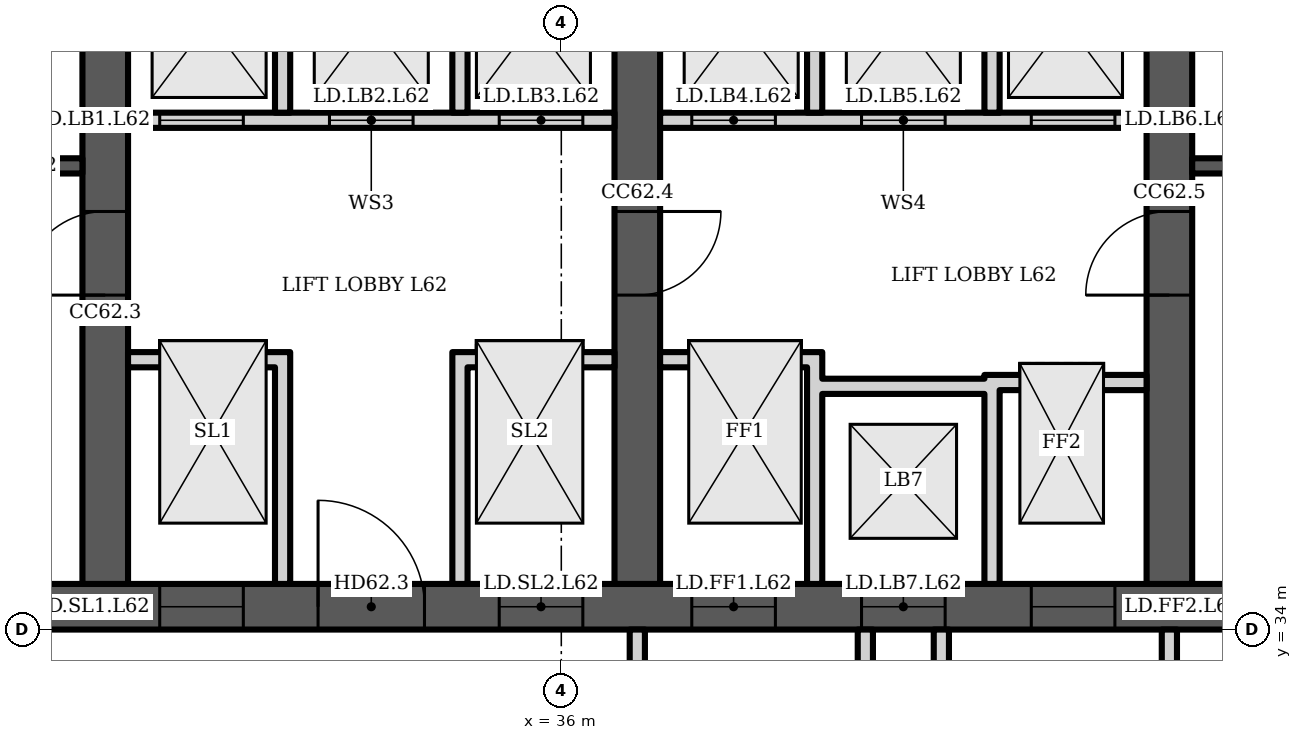
"""IFC4 building model, lengths in metres.
Left out: names, types, materials, properties, quantities, classifications, styles, units other than length and angle.
Written with IfcOpenShell. Run it as: python <this file> out.ifc"""

import sys

from ifc_helpers import new_model, si_unit, direction, frame, frame_2d, origin, place, context, subcontext, project, spatial, polyline, rectangle, outline, extrude, element, fill, save


model = new_model("IFC4")
c1 = context("Model", 3, precision=1e-05, world=origin(), true_north=direction((0.0, 1.0)))
c2 = subcontext(c1, "Body", "Model", "MODEL_VIEW")
j1 = project(units=[si_unit("LENGTHUNIT", "METRE"), si_unit("PLANEANGLEUNIT", "RADIAN")], contexts=[c1])
p1 = place(None, origin())
s1 = spatial("IfcSite", under=j1, at=p1, CompositionType="ELEMENT")
p2 = place(p1, origin())
s2 = spatial("IfcBuilding", under=s1, at=p2, CompositionType="ELEMENT")
p3 = place(p2, frame((0.0, 0.0, 246.7)))
s3 = spatial("IfcBuildingStorey", under=s2, at=p3, CompositionType="ELEMENT", Elevation=246.7)
p4 = place(p3, frame((23.0, 34.3, 0.0), z_axis=(0.0, 0.0, 1.0), x_axis=(1.0, 0.0, 0.0)))
e1 = element("IfcWall", 1, at=p4, inside=s3, PredefinedType="SHEAR", context=c2, shape_type="SweptSolid", body=[
    extrude(rectangle(XDim=35.0, YDim=0.6, at=frame_2d((17.5, 0.0))), origin(), (0.0, 0.0, 1.0), 3.6),
])
p5 = place(p4, frame((0.65, 0.0, 0.0)))
e2 = element("IfcOpeningElement", 2, at=p5, cuts=e1, PredefinedType="OPENING", context=c2, shape_type="SweptSolid", body=[
    extrude(rectangle(XDim=1.2, YDim=2.1, at=frame_2d((0.6, 1.05))), frame((0.0, 0.31, 0.0), z_axis=(0.0, -1.0, 0.0), x_axis=(1.0, 0.0, 0.0)), (0.0, 0.0, 1.0), 0.62),
])
p6 = place(p4, frame((7.717, 0.0, 0.0)))
e3 = element("IfcOpeningElement", 3, at=p6, cuts=e1, PredefinedType="OPENING", context=c2, shape_type="SweptSolid", body=[
    extrude(rectangle(XDim=1.1, YDim=2.1, at=frame_2d((0.55, 1.05))), frame((0.0, 0.31, 0.0), z_axis=(0.0, -1.0, 0.0), x_axis=(1.0, 0.0, 0.0)), (0.0, 0.0, 1.0), 0.62),
])
p7 = place(p4, frame((12.183, 0.0, 0.0)))
e4 = element("IfcOpeningElement", 4, at=p7, cuts=e1, PredefinedType="OPENING", context=c2, shape_type="SweptSolid", body=[
    extrude(rectangle(XDim=1.1, YDim=2.1, at=frame_2d((0.55, 1.05))), frame((0.0, 0.31, 0.0), z_axis=(0.0, -1.0, 0.0), x_axis=(1.0, 0.0, 0.0)), (0.0, 0.0, 1.0), 0.62),
])
p8 = place(p4, frame((9.8, 0.0, 0.0)))
e5 = element("IfcOpeningElement", 5, at=p8, cuts=e1, PredefinedType="OPENING", context=c2, shape_type="SweptSolid", body=[
    extrude(rectangle(XDim=1.4, YDim=2.1, at=frame_2d((0.7, 1.05))), frame((0.0, 0.31, 0.0), z_axis=(0.0, -1.0, 0.0), x_axis=(1.0, 0.0, 0.0)), (0.0, 0.0, 1.0), 0.62),
])
p9 = place(p4, frame((14.717, 0.0, 0.0)))
e6 = element("IfcOpeningElement", 6, at=p9, cuts=e1, PredefinedType="OPENING", context=c2, shape_type="SweptSolid", body=[
    extrude(rectangle(XDim=1.1, YDim=2.1, at=frame_2d((0.55, 1.05))), frame((0.0, 0.31, 0.0), z_axis=(0.0, -1.0, 0.0), x_axis=(1.0, 0.0, 0.0)), (0.0, 0.0, 1.0), 0.62),
])
p10 = place(p4, frame((16.95, 0.0, 0.0)))
e7 = element("IfcOpeningElement", 7, at=p10, cuts=e1, PredefinedType="OPENING", context=c2, shape_type="SweptSolid", body=[
    extrude(rectangle(XDim=1.1, YDim=2.1, at=frame_2d((0.55, 1.05))), frame((0.0, 0.31, 0.0), z_axis=(0.0, -1.0, 0.0), x_axis=(1.0, 0.0, 0.0)), (0.0, 0.0, 1.0), 0.62),
])
p11 = place(p4, frame((19.183, 0.0, 0.0)))
e8 = element("IfcOpeningElement", 8, at=p11, cuts=e1, PredefinedType="OPENING", context=c2, shape_type="SweptSolid", body=[
    extrude(rectangle(XDim=1.1, YDim=2.1, at=frame_2d((0.55, 1.05))), frame((0.0, 0.31, 0.0), z_axis=(0.0, -1.0, 0.0), x_axis=(1.0, 0.0, 0.0)), (0.0, 0.0, 1.0), 0.62),
])
p12 = place(p4, frame((26.15, 0.0, 0.0)))
e9 = element("IfcOpeningElement", 9, at=p12, cuts=e1, PredefinedType="OPENING", context=c2, shape_type="SweptSolid", body=[
    extrude(rectangle(XDim=1.2, YDim=2.1, at=frame_2d((0.6, 1.05))), frame((0.0, 0.31, 0.0), z_axis=(0.0, -1.0, 0.0), x_axis=(1.0, 0.0, 0.0)), (0.0, 0.0, 1.0), 0.62),
])
p13 = place(p4, frame((30.8, 0.0, 0.0)))
e10 = element("IfcOpeningElement", 10, at=p13, cuts=e1, PredefinedType="OPENING", context=c2, shape_type="SweptSolid", body=[
    extrude(rectangle(XDim=1.4, YDim=2.1, at=frame_2d((0.7, 1.05))), frame((0.0, 0.31, 0.0), z_axis=(0.0, -1.0, 0.0), x_axis=(1.0, 0.0, 0.0)), (0.0, 0.0, 1.0), 0.62),
])
p14 = place(p3, frame((30.0, 34.6, 0.0), z_axis=(0.0, 0.0, 1.0), x_axis=(0.0, 1.0, 0.0)))
e11 = element("IfcWall", 11, at=p14, inside=s3, PredefinedType="SHEAR", context=c2, shape_type="SweptSolid", body=[
    extrude(rectangle(XDim=14.171, YDim=0.6, at=frame_2d((7.085, 0.0))), origin(), (0.0, 0.0, 1.0), 3.6),
])
p15 = place(p14, frame((3.8, 0.0, 0.0)))
e12 = element("IfcOpeningElement", 12, at=p15, cuts=e11, PredefinedType="OPENING", context=c2, shape_type="SweptSolid", body=[
    extrude(rectangle(XDim=1.1, YDim=2.1, at=frame_2d((0.55, 1.05))), frame((0.0, 0.31, 0.0), z_axis=(0.0, -1.0, 0.0), x_axis=(1.0, 0.0, 0.0)), (0.0, 0.0, 1.0), 0.62),
])
p16 = place(p3, frame((37.0, 34.6, 0.0), z_axis=(0.0, 0.0, 1.0), x_axis=(0.0, 1.0, 0.0)))
e13 = element("IfcWall", 13, at=p16, inside=s3, PredefinedType="SHEAR", context=c2, shape_type="SweptSolid", body=[
    extrude(rectangle(XDim=14.784, YDim=0.6, at=frame_2d((7.392, 0.0))), origin(), (0.0, 0.0, 1.0), 3.6),
])
p17 = place(p16, frame((11.302, 0.0, 0.0)))
e14 = element("IfcOpeningElement", 14, at=p17, cuts=e13, PredefinedType="OPENING", context=c2, shape_type="SweptSolid", body=[
    extrude(rectangle(XDim=1.0, YDim=2.1, at=frame_2d((0.5, 1.05))), frame((0.0, 0.31, 0.0), z_axis=(0.0, -1.0, 0.0), x_axis=(1.0, 0.0, 0.0)), (0.0, 0.0, 1.0), 0.62),
])
p18 = place(p16, frame((3.8, 0.0, 0.0)))
e15 = element("IfcOpeningElement", 15, at=p18, cuts=e13, PredefinedType="OPENING", context=c2, shape_type="SweptSolid", body=[
    extrude(rectangle(XDim=1.1, YDim=2.1, at=frame_2d((0.55, 1.05))), frame((0.0, 0.31, 0.0), z_axis=(0.0, -1.0, 0.0), x_axis=(1.0, 0.0, 0.0)), (0.0, 0.0, 1.0), 0.62),
])
p19 = place(p3, frame((44.0, 34.6, 0.0), z_axis=(0.0, 0.0, 1.0), x_axis=(0.0, 1.0, 0.0)))
e16 = element("IfcWall", 16, at=p19, inside=s3, PredefinedType="SHEAR", context=c2, shape_type="SweptSolid", body=[
    extrude(rectangle(XDim=14.784, YDim=0.6, at=frame_2d((7.392, 0.0))), origin(), (0.0, 0.0, 1.0), 3.6),
])
p20 = place(p19, frame((11.608, 0.0, 0.0)))
e17 = element("IfcOpeningElement", 17, at=p20, cuts=e16, PredefinedType="OPENING", context=c2, shape_type="SweptSolid", body=[
    extrude(rectangle(XDim=1.0, YDim=2.1, at=frame_2d((0.5, 1.05))), frame((0.0, 0.31, 0.0), z_axis=(0.0, -1.0, 0.0), x_axis=(1.0, 0.0, 0.0)), (0.0, 0.0, 1.0), 0.62),
])
p21 = place(p19, frame((3.8, 0.0, 0.0)))
e18 = element("IfcOpeningElement", 18, at=p21, cuts=e16, PredefinedType="OPENING", context=c2, shape_type="SweptSolid", body=[
    extrude(rectangle(XDim=1.1, YDim=2.1, at=frame_2d((0.55, 1.05))), frame((0.0, 0.31, 0.0), z_axis=(0.0, -1.0, 0.0), x_axis=(1.0, 0.0, 0.0)), (0.0, 0.0, 1.0), 0.62),
])
p22 = place(p3, frame((23.6, 40.1, 0.0), z_axis=(0.0, 0.0, 1.0), x_axis=(1.0, 0.0, 0.0)))
e19 = element("IfcWall", 19, at=p22, inside=s3, PredefinedType="SHEAR", context=c2, shape_type="SweptSolid", body=[
    extrude(rectangle(XDim=6.1, YDim=0.2, at=frame_2d((3.05, 0.0))), origin(), (0.0, 0.0, 1.0), 3.2),
])
p23 = place(p22, frame((3.325, 0.0, 0.0)))
e20 = element("IfcOpeningElement", 20, at=p23, cuts=e19, PredefinedType="OPENING", context=c2, shape_type="SweptSolid", body=[
    extrude(rectangle(XDim=1.2, YDim=2.1, at=frame_2d((0.6, 1.05))), frame((0.0, 0.11, 0.0), z_axis=(0.0, -1.0, 0.0), x_axis=(1.0, 0.0, 0.0)), (0.0, 0.0, 1.0), 0.22),
])
p24 = place(p22, frame((0.475, 0.0, 0.0)))
e21 = element("IfcOpeningElement", 21, at=p24, cuts=e19, PredefinedType="OPENING", context=c2, shape_type="SweptSolid", body=[
    extrude(rectangle(XDim=0.9, YDim=2.1, at=frame_2d((0.45, 1.05))), frame((0.0, 0.11, 0.0), z_axis=(0.0, -1.0, 0.0), x_axis=(1.0, 0.0, 0.0)), (0.0, 0.0, 1.0), 0.22),
])
p25 = place(p3, frame((30.3, 40.7, 0.0), z_axis=(0.0, 0.0, 1.0), x_axis=(1.0, 0.0, 0.0)))
e22 = element("IfcWall", 22, at=p25, inside=s3, PredefinedType="PARTITIONING", context=c2, shape_type="SweptSolid", body=[
    extrude(rectangle(XDim=6.4, YDim=0.2, at=frame_2d((3.2, 0.0))), origin(), (0.0, 0.0, 1.0), 3.2),
])
p26 = place(p25, frame((0.417, 0.0, 0.0)))
e23 = element("IfcOpeningElement", 23, at=p26, cuts=e22, PredefinedType="OPENING", context=c2, shape_type="SweptSolid", body=[
    extrude(rectangle(XDim=1.1, YDim=2.1, at=frame_2d((0.55, 1.05))), frame((0.0, 0.11, 0.0), z_axis=(0.0, -1.0, 0.0), x_axis=(1.0, 0.0, 0.0)), (0.0, 0.0, 1.0), 0.22),
])
p27 = place(p25, frame((2.65, 0.0, 0.0)))
e24 = element("IfcOpeningElement", 24, at=p27, cuts=e22, PredefinedType="OPENING", context=c2, shape_type="SweptSolid", body=[
    extrude(rectangle(XDim=1.1, YDim=2.1, at=frame_2d((0.55, 1.05))), frame((0.0, 0.11, 0.0), z_axis=(0.0, -1.0, 0.0), x_axis=(1.0, 0.0, 0.0)), (0.0, 0.0, 1.0), 0.22),
])
p28 = place(p25, frame((4.883, 0.0, 0.0)))
e25 = element("IfcOpeningElement", 25, at=p28, cuts=e22, PredefinedType="OPENING", context=c2, shape_type="SweptSolid", body=[
    extrude(rectangle(XDim=1.1, YDim=2.1, at=frame_2d((0.55, 1.05))), frame((0.0, 0.11, 0.0), z_axis=(0.0, -1.0, 0.0), x_axis=(1.0, 0.0, 0.0)), (0.0, 0.0, 1.0), 0.22),
])
p29 = place(p3, frame((0.0, 0.0, -0.0)))
e26 = element("IfcWall", 26, at=p29, inside=s3, PredefinedType="PARTITIONING", context=c2, shape_type="SweptSolid", body=[
    extrude(outline(polyline([(32.233, 37.45), (30.3, 37.45), (30.3, 37.65), (32.233, 37.65), (32.433, 37.65), (32.433, 34.6), (32.233, 34.6), (32.233, 37.45)])), origin(), (0.0, 0.0, 1.0), 3.2),
])
p30 = place(p3, frame((0.0, 0.0, -0.0)))
e27 = element("IfcWall", 27, at=p30, inside=s3, PredefinedType="PARTITIONING", context=c2, shape_type="SweptSolid", body=[
    extrude(outline(polyline([(34.567, 37.65), (34.767, 37.65), (36.7, 37.65), (36.7, 37.45), (34.767, 37.45), (34.767, 34.6), (34.567, 34.6), (34.567, 37.65)])), origin(), (0.0, 0.0, 1.0), 3.2),
])
p31 = place(p3, frame((0.0, 0.0, -0.0)))
e28 = element("IfcWall", 28, at=p31, inside=s3, PredefinedType="PARTITIONING", context=c2, shape_type="SweptSolid", body=[
    extrude(outline(polyline([(32.433, 40.8), (32.233, 40.8), (32.233, 43.8), (30.3, 43.8), (30.3, 44.0), (36.7, 44.0), (36.7, 43.8), (34.767, 43.8), (34.767, 40.8), (34.567, 40.8), (34.567, 43.8), (32.433, 43.8), (32.433, 40.8)])), origin(), (0.0, 0.0, 1.0), 3.2),
])
p32 = place(p3, frame((37.3, 40.7, 0.0), z_axis=(0.0, 0.0, 1.0), x_axis=(1.0, 0.0, 0.0)))
e29 = element("IfcWall", 29, at=p32, inside=s3, PredefinedType="PARTITIONING", context=c2, shape_type="SweptSolid", body=[
    extrude(rectangle(XDim=6.4, YDim=0.2, at=frame_2d((3.2, 0.0))), origin(), (0.0, 0.0, 1.0), 3.2),
])
p33 = place(p32, frame((0.417, 0.0, 0.0)))
e30 = element("IfcOpeningElement", 30, at=p33, cuts=e29, PredefinedType="OPENING", context=c2, shape_type="SweptSolid", body=[
    extrude(rectangle(XDim=1.1, YDim=2.1, at=frame_2d((0.55, 1.05))), frame((0.0, 0.11, 0.0), z_axis=(0.0, -1.0, 0.0), x_axis=(1.0, 0.0, 0.0)), (0.0, 0.0, 1.0), 0.22),
])
p34 = place(p32, frame((2.65, 0.0, 0.0)))
e31 = element("IfcOpeningElement", 31, at=p34, cuts=e29, PredefinedType="OPENING", context=c2, shape_type="SweptSolid", body=[
    extrude(rectangle(XDim=1.1, YDim=2.1, at=frame_2d((0.55, 1.05))), frame((0.0, 0.11, 0.0), z_axis=(0.0, -1.0, 0.0), x_axis=(1.0, 0.0, 0.0)), (0.0, 0.0, 1.0), 0.22),
])
p35 = place(p32, frame((4.883, 0.0, 0.0)))
e32 = element("IfcOpeningElement", 32, at=p35, cuts=e29, PredefinedType="OPENING", context=c2, shape_type="SweptSolid", body=[
    extrude(rectangle(XDim=1.1, YDim=2.1, at=frame_2d((0.55, 1.05))), frame((0.0, 0.11, 0.0), z_axis=(0.0, -1.0, 0.0), x_axis=(1.0, 0.0, 0.0)), (0.0, 0.0, 1.0), 0.22),
])
p36 = place(p3, frame((0.0, 0.0, -0.0)))
e33 = element("IfcWall", 33, at=p36, inside=s3, PredefinedType="PARTITIONING", context=c2, shape_type="SweptSolid", body=[
    extrude(outline(polyline([(41.567, 37.1), (39.433, 37.1), (39.433, 34.6), (39.233, 34.6), (39.233, 37.45), (37.3, 37.45), (37.3, 37.65), (39.233, 37.65), (39.433, 37.65), (39.433, 37.3), (41.567, 37.3), (41.567, 37.35), (41.767, 37.35), (43.7, 37.35), (43.7, 37.15), (41.767, 37.15), (41.767, 34.6), (41.567, 34.6), (41.567, 37.1)])), origin(), (0.0, 0.0, 1.0), 3.2),
])
p37 = place(p3, frame((0.0, 0.0, -0.0)))
e34 = element("IfcWall", 34, at=p37, inside=s3, PredefinedType="PARTITIONING", context=c2, shape_type="SweptSolid", body=[
    extrude(outline(polyline([(39.433, 40.8), (39.233, 40.8), (39.233, 43.8), (37.3, 43.8), (37.3, 44.0), (43.7, 44.0), (43.7, 43.8), (41.767, 43.8), (41.767, 40.8), (41.567, 40.8), (41.567, 43.8), (39.433, 43.8), (39.433, 40.8)])), origin(), (0.0, 0.0, 1.0), 3.2),
])
p38 = place(p3, frame((44.3, 40.1, 0.0), z_axis=(0.0, 0.0, 1.0), x_axis=(1.0, 0.0, 0.0)))
e35 = element("IfcWall", 35, at=p38, inside=s3, PredefinedType="SHEAR", context=c2, shape_type="SweptSolid", body=[
    extrude(rectangle(XDim=6.4, YDim=0.2, at=frame_2d((3.2, 0.0))), origin(), (0.0, 0.0, 1.0), 3.2),
])
p39 = place(p38, frame((3.625, 0.0, 0.0)))
e36 = element("IfcOpeningElement", 36, at=p39, cuts=e35, PredefinedType="OPENING", context=c2, shape_type="SweptSolid", body=[
    extrude(rectangle(XDim=1.2, YDim=2.1, at=frame_2d((0.6, 1.05))), frame((0.0, 0.11, 0.0), z_axis=(0.0, -1.0, 0.0), x_axis=(1.0, 0.0, 0.0)), (0.0, 0.0, 1.0), 0.22),
])
p40 = place(p38, frame((0.625, 0.0, 0.0)))
e37 = element("IfcOpeningElement", 37, at=p40, cuts=e35, PredefinedType="OPENING", context=c2, shape_type="SweptSolid", body=[
    extrude(rectangle(XDim=0.9, YDim=2.1, at=frame_2d((0.45, 1.05))), frame((0.0, 0.11, 0.0), z_axis=(0.0, -1.0, 0.0), x_axis=(1.0, 0.0, 0.0)), (0.0, 0.0, 1.0), 0.22),
])
p41 = place(p3, frame((37.0, 30.5, 0.0), z_axis=(0.0, 0.0, 1.0), x_axis=(0.0, 1.0, 0.0)))
e38 = element("IfcWall", 38, at=p41, inside=s3, PredefinedType="PARTITIONING", context=c2, shape_type="SweptSolid", body=[
    extrude(rectangle(XDim=3.5, YDim=0.2, at=frame_2d((1.75, 0.0))), origin(), (0.0, 0.0, 1.0), 3.2),
])
p42 = place(p41, frame((1.2, 0.0, 0.0)))
e39 = element("IfcOpeningElement", 39, at=p42, cuts=e38, PredefinedType="OPENING", context=c2, shape_type="SweptSolid", body=[
    extrude(rectangle(XDim=1.1, YDim=2.1, at=frame_2d((0.55, 1.05))), frame((0.0, 0.11, 0.0), z_axis=(0.0, -1.0, 0.0), x_axis=(1.0, 0.0, 0.0)), (0.0, 0.0, 1.0), 0.22),
])
for number, where, z_axis, x_axis in (
    (40, (40.0, 30.5, 0.0), (0.0, 0.0, 1.0), (0.0, 1.0, 0.0)),
    (41, (41.0, 30.5, 0.0), (0.0, 0.0, 1.0), (0.0, 1.0, 0.0)),
):
    element("IfcWall", number, at=place(p3, frame(where, z_axis=z_axis, x_axis=x_axis)), inside=s3, PredefinedType="PARTITIONING", context=c2, shape_type="SweptSolid", body=[
        extrude(rectangle(XDim=3.5, YDim=0.2, at=frame_2d((1.75, 0.0))), origin(), (0.0, 0.0, 1.0), 3.2),
    ])
p43 = place(p3, frame((44.0, 30.5, 0.0), z_axis=(0.0, 0.0, 1.0), x_axis=(0.0, 1.0, 0.0)))
e42 = element("IfcWall", 42, at=p43, inside=s3, PredefinedType="PARTITIONING", context=c2, shape_type="SweptSolid", body=[
    extrude(rectangle(XDim=3.5, YDim=0.2, at=frame_2d((1.75, 0.0))), origin(), (0.0, 0.0, 1.0), 3.2),
])
p44 = place(p43, frame((1.2, 0.0, 0.0)))
e43 = element("IfcOpeningElement", 43, at=p44, cuts=e42, PredefinedType="OPENING", context=c2, shape_type="SweptSolid", body=[
    extrude(rectangle(XDim=1.1, YDim=2.1, at=frame_2d((0.55, 1.05))), frame((0.0, 0.11, 0.0), z_axis=(0.0, -1.0, 0.0), x_axis=(1.0, 0.0, 0.0)), (0.0, 0.0, 1.0), 0.22),
])
p45 = place(p6, origin())
e44 = element("IfcDoor", 44, at=p45, inside=s3, OperationType="DOUBLE_DOOR_SLIDING", PredefinedType="DOOR", context=c2, shape_type="SweptSolid", body=[
    extrude(rectangle(XDim=1.1, YDim=2.1, at=frame_2d((0.55, 1.05))), frame((0.0, 0.025, 0.0), z_axis=(0.0, -1.0, 0.0), x_axis=(1.0, 0.0, 0.0)), (0.0, 0.0, 1.0), 0.05),
])
fill(e3, e44)
p46 = place(p7, origin())
e45 = element("IfcDoor", 45, at=p46, inside=s3, OperationType="DOUBLE_DOOR_SLIDING", PredefinedType="DOOR", context=c2, shape_type="SweptSolid", body=[
    extrude(rectangle(XDim=1.1, YDim=2.1, at=frame_2d((0.55, 1.05))), frame((0.0, 0.025, 0.0), z_axis=(0.0, -1.0, 0.0), x_axis=(1.0, 0.0, 0.0)), (0.0, 0.0, 1.0), 0.05),
])
fill(e4, e45)
p47 = place(p8, origin())
e46 = element("IfcDoor", 46, at=p47, inside=s3, OperationType="DOUBLE_DOOR_SINGLE_SWING", PredefinedType="DOOR", context=c2, shape_type="SweptSolid", body=[
    extrude(rectangle(XDim=1.4, YDim=2.1, at=frame_2d((0.7, 1.05))), frame((0.0, 0.025, 0.0), z_axis=(0.0, -1.0, 0.0), x_axis=(1.0, 0.0, 0.0)), (0.0, 0.0, 1.0), 0.05),
])
fill(e5, e46)
p48 = place(p26, origin())
e47 = element("IfcDoor", 47, at=p48, inside=s3, OperationType="DOUBLE_DOOR_SLIDING", PredefinedType="DOOR", context=c2, shape_type="SweptSolid", body=[
    extrude(rectangle(XDim=1.1, YDim=2.1, at=frame_2d((0.55, 1.05))), frame((0.0, 0.025, 0.0), z_axis=(0.0, -1.0, 0.0), x_axis=(1.0, 0.0, 0.0)), (0.0, 0.0, 1.0), 0.05),
])
fill(e23, e47)
p49 = place(p27, origin())
e48 = element("IfcDoor", 48, at=p49, inside=s3, OperationType="DOUBLE_DOOR_SLIDING", PredefinedType="DOOR", context=c2, shape_type="SweptSolid", body=[
    extrude(rectangle(XDim=1.1, YDim=2.1, at=frame_2d((0.55, 1.05))), frame((0.0, 0.025, 0.0), z_axis=(0.0, -1.0, 0.0), x_axis=(1.0, 0.0, 0.0)), (0.0, 0.0, 1.0), 0.05),
])
fill(e24, e48)
p50 = place(p28, origin())
e49 = element("IfcDoor", 49, at=p50, inside=s3, OperationType="DOUBLE_DOOR_SLIDING", PredefinedType="DOOR", context=c2, shape_type="SweptSolid", body=[
    extrude(rectangle(XDim=1.1, YDim=2.1, at=frame_2d((0.55, 1.05))), frame((0.0, 0.025, 0.0), z_axis=(0.0, -1.0, 0.0), x_axis=(1.0, 0.0, 0.0)), (0.0, 0.0, 1.0), 0.05),
])
fill(e25, e49)
p51 = place(p9, origin())
e50 = element("IfcDoor", 50, at=p51, inside=s3, OperationType="DOUBLE_DOOR_SLIDING", PredefinedType="DOOR", context=c2, shape_type="SweptSolid", body=[
    extrude(rectangle(XDim=1.1, YDim=2.1, at=frame_2d((0.55, 1.05))), frame((0.0, 0.025, 0.0), z_axis=(0.0, -1.0, 0.0), x_axis=(1.0, 0.0, 0.0)), (0.0, 0.0, 1.0), 0.05),
])
fill(e6, e50)
p52 = place(p10, origin())
e51 = element("IfcDoor", 51, at=p52, inside=s3, OperationType="DOUBLE_DOOR_SLIDING", PredefinedType="DOOR", context=c2, shape_type="SweptSolid", body=[
    extrude(rectangle(XDim=1.1, YDim=2.1, at=frame_2d((0.55, 1.05))), frame((0.0, 0.025, 0.0), z_axis=(0.0, -1.0, 0.0), x_axis=(1.0, 0.0, 0.0)), (0.0, 0.0, 1.0), 0.05),
])
fill(e7, e51)
p53 = place(p11, origin())
e52 = element("IfcDoor", 52, at=p53, inside=s3, OperationType="DOUBLE_DOOR_SLIDING", PredefinedType="DOOR", context=c2, shape_type="SweptSolid", body=[
    extrude(rectangle(XDim=1.1, YDim=2.1, at=frame_2d((0.55, 1.05))), frame((0.0, 0.025, 0.0), z_axis=(0.0, -1.0, 0.0), x_axis=(1.0, 0.0, 0.0)), (0.0, 0.0, 1.0), 0.05),
])
fill(e8, e52)
p54 = place(p33, origin())
e53 = element("IfcDoor", 53, at=p54, inside=s3, OperationType="DOUBLE_DOOR_SLIDING", PredefinedType="DOOR", context=c2, shape_type="SweptSolid", body=[
    extrude(rectangle(XDim=1.1, YDim=2.1, at=frame_2d((0.55, 1.05))), frame((0.0, 0.025, 0.0), z_axis=(0.0, -1.0, 0.0), x_axis=(1.0, 0.0, 0.0)), (0.0, 0.0, 1.0), 0.05),
])
fill(e30, e53)
p55 = place(p34, origin())
e54 = element("IfcDoor", 54, at=p55, inside=s3, OperationType="DOUBLE_DOOR_SLIDING", PredefinedType="DOOR", context=c2, shape_type="SweptSolid", body=[
    extrude(rectangle(XDim=1.1, YDim=2.1, at=frame_2d((0.55, 1.05))), frame((0.0, 0.025, 0.0), z_axis=(0.0, -1.0, 0.0), x_axis=(1.0, 0.0, 0.0)), (0.0, 0.0, 1.0), 0.05),
])
fill(e31, e54)
p56 = place(p35, origin())
e55 = element("IfcDoor", 55, at=p56, inside=s3, OperationType="DOUBLE_DOOR_SLIDING", PredefinedType="DOOR", context=c2, shape_type="SweptSolid", body=[
    extrude(rectangle(XDim=1.1, YDim=2.1, at=frame_2d((0.55, 1.05))), frame((0.0, 0.025, 0.0), z_axis=(0.0, -1.0, 0.0), x_axis=(1.0, 0.0, 0.0)), (0.0, 0.0, 1.0), 0.05),
])
fill(e32, e55)
p57 = place(p15, origin())
e56 = element("IfcDoor", 56, at=p57, inside=s3, OperationType="SINGLE_SWING_LEFT", PredefinedType="DOOR", context=c2, shape_type="SweptSolid", body=[
    extrude(rectangle(XDim=1.1, YDim=2.1, at=frame_2d((0.55, 1.05))), frame((0.0, 0.025, 0.0), z_axis=(0.0, -1.0, 0.0), x_axis=(1.0, 0.0, 0.0)), (0.0, 0.0, 1.0), 0.05),
])
fill(e12, e56)
p58 = place(p18, origin())
e57 = element("IfcDoor", 57, at=p58, inside=s3, OperationType="SINGLE_SWING_RIGHT", PredefinedType="DOOR", context=c2, shape_type="SweptSolid", body=[
    extrude(rectangle(XDim=1.1, YDim=2.1, at=frame_2d((0.55, 1.05))), frame((0.0, 0.025, 0.0), z_axis=(0.0, -1.0, 0.0), x_axis=(1.0, 0.0, 0.0)), (0.0, 0.0, 1.0), 0.05),
])
fill(e15, e57)
p59 = place(p21, origin())
e58 = element("IfcDoor", 58, at=p59, inside=s3, OperationType="SINGLE_SWING_LEFT", PredefinedType="DOOR", context=c2, shape_type="SweptSolid", body=[
    extrude(rectangle(XDim=1.1, YDim=2.1, at=frame_2d((0.55, 1.05))), frame((0.0, 0.025, 0.0), z_axis=(0.0, -1.0, 0.0), x_axis=(1.0, 0.0, 0.0)), (0.0, 0.0, 1.0), 0.05),
])
fill(e18, e58)
save(model, sys.argv[1])
